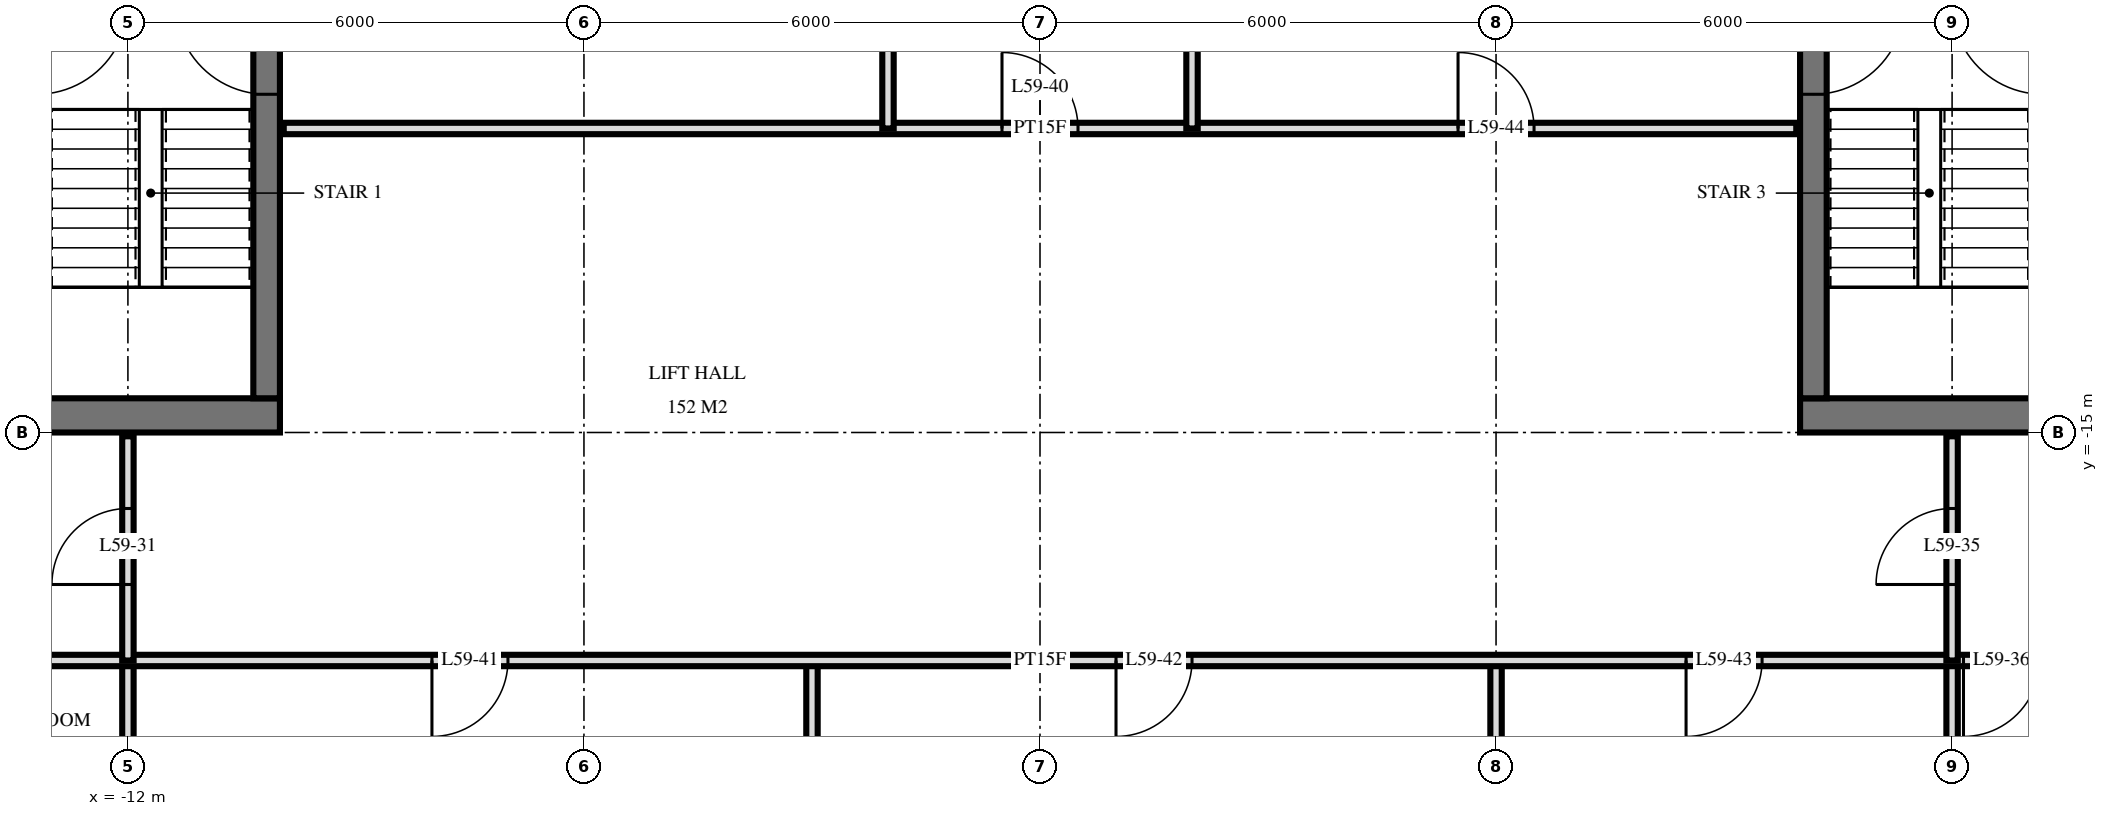
"""IFC4 building model, lengths in metres.
Left out: names, types, materials, properties, quantities, classifications, styles, units other than length and angle.
Written with IfcOpenShell. Run it as: python <this file> out.ifc"""

import sys

from ifc_helpers import new_model, si_unit, direction, frame, frame_2d, origin, place, context, subcontext, project, spatial, rectangle, extrude, element, fill, save


model = new_model("IFC4")
c1 = context("Model", 3, precision=1e-05, world=origin(), true_north=direction((0.0, 1.0)))
c2 = subcontext(c1, "Body", "Model", "MODEL_VIEW")
j1 = project(units=[si_unit("LENGTHUNIT", "METRE"), si_unit("PLANEANGLEUNIT", "RADIAN")], contexts=[c1])
p1 = place(None, origin())
s1 = spatial("IfcSite", under=j1, at=p1, CompositionType="ELEMENT")
p2 = place(p1, origin())
s2 = spatial("IfcBuilding", under=s1, at=p2, CompositionType="ELEMENT")
p3 = place(p2, frame((0.0, 0.0, 225.6)))
s3 = spatial("IfcBuildingStorey", under=s2, at=p3, CompositionType="ELEMENT", Elevation=225.6)
p4 = place(p3, frame((-24.5, -14.775, 0.0), z_axis=(0.0, 0.0, 1.0), x_axis=(1.0, 0.0, 0.0)))
e1 = element("IfcWall", 1, at=p4, inside=s3, PredefinedType="SHEAR", context=c2, shape_type="SweptSolid", body=[
    extrude(rectangle(XDim=14.5, YDim=0.45, at=frame_2d((7.25, 0.0))), origin(), (0.0, 0.0, 1.0), 3.5),
])
p5 = place(p4, frame((6.2, 0.0, 0.0)))
e2 = element("IfcOpeningElement", 2, at=p5, cuts=e1, PredefinedType="OPENING", context=c2, shape_type="SweptSolid", body=[
    extrude(rectangle(XDim=1.2, YDim=2.1, at=frame_2d((0.6, 1.05))), frame((0.0, 0.235, 0.0), z_axis=(0.0, -1.0, 0.0), x_axis=(1.0, 0.0, 0.0)), (0.0, 0.0, 1.0), 0.47),
])
p6 = place(p4, frame((9.25, 0.0, 0.0)))
e3 = element("IfcOpeningElement", 3, at=p6, cuts=e1, PredefinedType="OPENING", context=c2, shape_type="SweptSolid", body=[
    extrude(rectangle(XDim=1.1, YDim=2.1, at=frame_2d((0.55, 1.05))), frame((0.0, 0.235, 0.0), z_axis=(0.0, -1.0, 0.0), x_axis=(1.0, 0.0, 0.0)), (0.0, 0.0, 1.0), 0.47),
])
p7 = place(p4, frame((3.5, 0.0, 0.0)))
e4 = element("IfcOpeningElement", 4, at=p7, cuts=e1, PredefinedType="OPENING", context=c2, shape_type="SweptSolid", body=[
    extrude(rectangle(XDim=0.9, YDim=2.1, at=frame_2d((0.45, 1.05))), frame((0.0, 0.235, 0.0), z_axis=(0.0, -1.0, 0.0), x_axis=(1.0, 0.0, 0.0)), (0.0, 0.0, 1.0), 0.47),
])
p8 = place(p4, frame((1.05, 0.0, 0.0)))
e5 = element("IfcOpeningElement", 5, at=p8, cuts=e1, PredefinedType="OPENING", context=c2, shape_type="SweptSolid", body=[
    extrude(rectangle(XDim=1.0, YDim=2.1, at=frame_2d((0.5, 1.05))), frame((0.0, 0.235, 0.0), z_axis=(0.0, -1.0, 0.0), x_axis=(1.0, 0.0, 0.0)), (0.0, 0.0, 1.0), 0.47),
])
p9 = place(p3, frame((-10.175, -14.55, 0.0), z_axis=(0.0, 0.0, 1.0), x_axis=(0.0, 1.0, 0.0)))
e6 = element("IfcWall", 6, at=p9, inside=s3, PredefinedType="SHEAR", context=c2, shape_type="SweptSolid", body=[
    extrude(rectangle(XDim=14.1, YDim=0.35, at=frame_2d((7.05, 0.0))), origin(), (0.0, 0.0, 1.0), 3.5),
])
p10 = place(p9, frame((8.4, 0.0, 0.0)))
e7 = element("IfcOpeningElement", 7, at=p10, cuts=e6, PredefinedType="OPENING", context=c2, shape_type="SweptSolid", body=[
    extrude(rectangle(XDim=1.4, YDim=2.4, at=frame_2d((0.7, 1.2))), frame((0.0, 0.185, 0.0), z_axis=(0.0, -1.0, 0.0), x_axis=(1.0, 0.0, 0.0)), (0.0, 0.0, 1.0), 0.37),
])
p11 = place(p9, frame((10.0, 0.0, 0.0)))
e8 = element("IfcOpeningElement", 8, at=p11, cuts=e6, PredefinedType="OPENING", context=c2, shape_type="SweptSolid", body=[
    extrude(rectangle(XDim=1.4, YDim=2.4, at=frame_2d((0.7, 1.2))), frame((0.0, 0.185, 0.0), z_axis=(0.0, -1.0, 0.0), x_axis=(1.0, 0.0, 0.0)), (0.0, 0.0, 1.0), 0.37),
])
p12 = place(p9, frame((4.0, 0.0, 0.0)))
e9 = element("IfcOpeningElement", 9, at=p12, cuts=e6, PredefinedType="OPENING", context=c2, shape_type="SweptSolid", body=[
    extrude(rectangle(XDim=1.2, YDim=2.1, at=frame_2d((0.6, 1.05))), frame((0.0, 0.185, 0.0), z_axis=(0.0, -1.0, 0.0), x_axis=(1.0, 0.0, 0.0)), (0.0, 0.0, 1.0), 0.37),
])
p13 = place(p3, frame((10.0, -14.775, 0.0), z_axis=(0.0, 0.0, 1.0), x_axis=(1.0, 0.0, 0.0)))
e10 = element("IfcWall", 10, at=p13, inside=s3, PredefinedType="SHEAR", context=c2, shape_type="SweptSolid", body=[
    extrude(rectangle(XDim=14.5, YDim=0.45, at=frame_2d((7.25, 0.0))), origin(), (0.0, 0.0, 1.0), 3.5),
])
p14 = place(p13, frame((7.1, 0.0, 0.0)))
e11 = element("IfcOpeningElement", 11, at=p14, cuts=e10, PredefinedType="OPENING", context=c2, shape_type="SweptSolid", body=[
    extrude(rectangle(XDim=1.2, YDim=2.1, at=frame_2d((0.6, 1.05))), frame((0.0, 0.235, 0.0), z_axis=(0.0, -1.0, 0.0), x_axis=(1.0, 0.0, 0.0)), (0.0, 0.0, 1.0), 0.47),
])
p15 = place(p13, frame((4.15, 0.0, 0.0)))
e12 = element("IfcOpeningElement", 12, at=p15, cuts=e10, PredefinedType="OPENING", context=c2, shape_type="SweptSolid", body=[
    extrude(rectangle(XDim=1.1, YDim=2.1, at=frame_2d((0.55, 1.05))), frame((0.0, 0.235, 0.0), z_axis=(0.0, -1.0, 0.0), x_axis=(1.0, 0.0, 0.0)), (0.0, 0.0, 1.0), 0.47),
])
p16 = place(p13, frame((10.1, 0.0, 0.0)))
e13 = element("IfcOpeningElement", 13, at=p16, cuts=e10, PredefinedType="OPENING", context=c2, shape_type="SweptSolid", body=[
    extrude(rectangle(XDim=0.9, YDim=2.1, at=frame_2d((0.45, 1.05))), frame((0.0, 0.235, 0.0), z_axis=(0.0, -1.0, 0.0), x_axis=(1.0, 0.0, 0.0)), (0.0, 0.0, 1.0), 0.47),
])
p17 = place(p13, frame((12.45, 0.0, 0.0)))
e14 = element("IfcOpeningElement", 14, at=p17, cuts=e10, PredefinedType="OPENING", context=c2, shape_type="SweptSolid", body=[
    extrude(rectangle(XDim=1.0, YDim=2.1, at=frame_2d((0.5, 1.05))), frame((0.0, 0.235, 0.0), z_axis=(0.0, -1.0, 0.0), x_axis=(1.0, 0.0, 0.0)), (0.0, 0.0, 1.0), 0.47),
])
p18 = place(p3, frame((10.175, -14.55, 0.0), z_axis=(0.0, 0.0, 1.0), x_axis=(0.0, 1.0, 0.0)))
e15 = element("IfcWall", 15, at=p18, inside=s3, PredefinedType="SHEAR", context=c2, shape_type="SweptSolid", body=[
    extrude(rectangle(XDim=14.1, YDim=0.35, at=frame_2d((7.05, 0.0))), origin(), (0.0, 0.0, 1.0), 3.5),
])
p19 = place(p18, frame((8.4, 0.0, 0.0)))
e16 = element("IfcOpeningElement", 16, at=p19, cuts=e15, PredefinedType="OPENING", context=c2, shape_type="SweptSolid", body=[
    extrude(rectangle(XDim=1.4, YDim=2.4, at=frame_2d((0.7, 1.2))), frame((0.0, 0.185, 0.0), z_axis=(0.0, -1.0, 0.0), x_axis=(1.0, 0.0, 0.0)), (0.0, 0.0, 1.0), 0.37),
])
p20 = place(p18, frame((10.0, 0.0, 0.0)))
e17 = element("IfcOpeningElement", 17, at=p20, cuts=e15, PredefinedType="OPENING", context=c2, shape_type="SweptSolid", body=[
    extrude(rectangle(XDim=1.4, YDim=2.4, at=frame_2d((0.7, 1.2))), frame((0.0, 0.185, 0.0), z_axis=(0.0, -1.0, 0.0), x_axis=(1.0, 0.0, 0.0)), (0.0, 0.0, 1.0), 0.37),
])
p21 = place(p18, frame((4.0, 0.0, 0.0)))
e18 = element("IfcOpeningElement", 18, at=p21, cuts=e15, PredefinedType="OPENING", context=c2, shape_type="SweptSolid", body=[
    extrude(rectangle(XDim=1.2, YDim=2.1, at=frame_2d((0.6, 1.05))), frame((0.0, 0.185, 0.0), z_axis=(0.0, -1.0, 0.0), x_axis=(1.0, 0.0, 0.0)), (0.0, 0.0, 1.0), 0.37),
])
p22 = place(p3, frame((12.0, -18.0, 0.0), z_axis=(0.0, 0.0, 1.0), x_axis=(0.0, 1.0, 0.0)))
e19 = element("IfcWall", 19, at=p22, inside=s3, PredefinedType="PARTITIONING", context=c2, shape_type="SweptSolid", body=[
    extrude(rectangle(XDim=2.95, YDim=0.15, at=frame_2d((1.475, 0.0))), origin(), (0.0, 0.0, 1.0), 3.22),
])
p23 = place(p22, frame((1.0, 0.0, 0.0)))
e20 = element("IfcOpeningElement", 20, at=p23, cuts=e19, PredefinedType="OPENING", context=c2, shape_type="SweptSolid", body=[
    extrude(rectangle(XDim=1.0, YDim=2.1, at=frame_2d((0.5, 1.05))), frame((0.0, 0.085, 0.0), z_axis=(0.0, -1.0, 0.0), x_axis=(1.0, 0.0, 0.0)), (0.0, 0.0, 1.0), 0.17),
])
for number, where, z_axis, x_axis in (
    (21, (12.0, -29.22, 0.0), (0.0, 0.0, 1.0), (0.0, 1.0, 0.0)),
    (22, (6.0, -29.22, 0.0), (0.0, 0.0, 1.0), (0.0, 1.0, 0.0)),
):
    element("IfcWall", number, at=place(p3, frame(where, z_axis=z_axis, x_axis=x_axis)), inside=s3, PredefinedType="PARTITIONING", context=c2, shape_type="SweptSolid", body=[
        extrude(rectangle(XDim=11.22, YDim=0.15, at=frame_2d((5.61, 0.0))), origin(), (0.0, 0.0, 1.0), 3.22),
    ])
for number, where, z_axis, x_axis in (
    (23, (2.0, -11.0, 0.0), (0.0, 0.0, 1.0), (0.0, 1.0, 0.0)),
    (24, (-2.0, -11.0, 0.0), (0.0, 0.0, 1.0), (0.0, 1.0, 0.0)),
):
    element("IfcWall", number, at=place(p3, frame(where, z_axis=z_axis, x_axis=x_axis)), inside=s3, PredefinedType="PARTITIONING", context=c2, shape_type="SweptSolid", body=[
        extrude(rectangle(XDim=4.0, YDim=0.15, at=frame_2d((2.0, 0.0))), origin(), (0.0, 0.0, 1.0), 3.22),
    ])
p24 = place(p3, frame((-3.0, -29.22, 0.0), z_axis=(0.0, 0.0, 1.0), x_axis=(0.0, 1.0, 0.0)))
e25 = element("IfcWall", 25, at=p24, inside=s3, PredefinedType="PARTITIONING", context=c2, shape_type="SweptSolid", body=[
    extrude(rectangle(XDim=11.22, YDim=0.15, at=frame_2d((5.61, 0.0))), origin(), (0.0, 0.0, 1.0), 3.22),
])
p25 = place(p3, frame((-12.0, -18.0, 0.0), z_axis=(0.0, 0.0, 1.0), x_axis=(0.0, 1.0, 0.0)))
e26 = element("IfcWall", 26, at=p25, inside=s3, PredefinedType="PARTITIONING", context=c2, shape_type="SweptSolid", body=[
    extrude(rectangle(XDim=2.95, YDim=0.15, at=frame_2d((1.475, 0.0))), origin(), (0.0, 0.0, 1.0), 3.22),
])
p26 = place(p25, frame((1.0, 0.0, 0.0)))
e27 = element("IfcOpeningElement", 27, at=p26, cuts=e26, PredefinedType="OPENING", context=c2, shape_type="SweptSolid", body=[
    extrude(rectangle(XDim=1.0, YDim=2.1, at=frame_2d((0.5, 1.05))), frame((0.0, 0.085, 0.0), z_axis=(0.0, -1.0, 0.0), x_axis=(1.0, 0.0, 0.0)), (0.0, 0.0, 1.0), 0.17),
])
p27 = place(p3, frame((-12.0, -29.22, 0.0), z_axis=(0.0, 0.0, 1.0), x_axis=(0.0, 1.0, 0.0)))
e28 = element("IfcWall", 28, at=p27, inside=s3, PredefinedType="PARTITIONING", context=c2, shape_type="SweptSolid", body=[
    extrude(rectangle(XDim=11.22, YDim=0.15, at=frame_2d((5.61, 0.0))), origin(), (0.0, 0.0, 1.0), 3.22),
])
p28 = place(p3, frame((-26.82, -18.0, 0.0), z_axis=(0.0, 0.0, 1.0), x_axis=(1.0, 0.0, 0.0)))
e29 = element("IfcWall", 29, at=p28, inside=s3, PredefinedType="PARTITIONING", context=c2, shape_type="SweptSolid", body=[
    extrude(rectangle(XDim=53.64, YDim=0.15, at=frame_2d((26.82, 0.0))), origin(), (0.0, 0.0, 1.0), 3.22),
])
p29 = place(p28, frame((4.92, 0.0, 0.0)))
e30 = element("IfcOpeningElement", 30, at=p29, cuts=e29, PredefinedType="OPENING", context=c2, shape_type="SweptSolid", body=[
    extrude(rectangle(XDim=1.0, YDim=2.1, at=frame_2d((0.5, 1.05))), frame((0.0, 0.085, 0.0), z_axis=(0.0, -1.0, 0.0), x_axis=(1.0, 0.0, 0.0)), (0.0, 0.0, 1.0), 0.17),
])
p30 = place(p28, frame((1.62, 0.0, 0.0)))
e31 = element("IfcOpeningElement", 31, at=p30, cuts=e29, PredefinedType="OPENING", context=c2, shape_type="SweptSolid", body=[
    extrude(rectangle(XDim=1.0, YDim=2.1, at=frame_2d((0.5, 1.05))), frame((0.0, 0.085, 0.0), z_axis=(0.0, -1.0, 0.0), x_axis=(1.0, 0.0, 0.0)), (0.0, 0.0, 1.0), 0.17),
])
p31 = place(p28, frame((38.97, 0.0, 0.0)))
e32 = element("IfcOpeningElement", 32, at=p31, cuts=e29, PredefinedType="OPENING", context=c2, shape_type="SweptSolid", body=[
    extrude(rectangle(XDim=1.0, YDim=2.1, at=frame_2d((0.5, 1.05))), frame((0.0, 0.085, 0.0), z_axis=(0.0, -1.0, 0.0), x_axis=(1.0, 0.0, 0.0)), (0.0, 0.0, 1.0), 0.17),
])
p32 = place(p28, frame((48.72, 0.0, 0.0)))
e33 = element("IfcOpeningElement", 33, at=p32, cuts=e29, PredefinedType="OPENING", context=c2, shape_type="SweptSolid", body=[
    extrude(rectangle(XDim=1.0, YDim=2.1, at=frame_2d((0.5, 1.05))), frame((0.0, 0.085, 0.0), z_axis=(0.0, -1.0, 0.0), x_axis=(1.0, 0.0, 0.0)), (0.0, 0.0, 1.0), 0.17),
])
p33 = place(p28, frame((46.92, 0.0, 0.0)))
e34 = element("IfcOpeningElement", 34, at=p33, cuts=e29, PredefinedType="OPENING", context=c2, shape_type="SweptSolid", body=[
    extrude(rectangle(XDim=1.0, YDim=2.1, at=frame_2d((0.5, 1.05))), frame((0.0, 0.085, 0.0), z_axis=(0.0, -1.0, 0.0), x_axis=(1.0, 0.0, 0.0)), (0.0, 0.0, 1.0), 0.17),
])
p34 = place(p28, frame((18.82, 0.0, 0.0)))
e35 = element("IfcOpeningElement", 35, at=p34, cuts=e29, PredefinedType="OPENING", context=c2, shape_type="SweptSolid", body=[
    extrude(rectangle(XDim=1.0, YDim=2.1, at=frame_2d((0.5, 1.05))), frame((0.0, 0.085, 0.0), z_axis=(0.0, -1.0, 0.0), x_axis=(1.0, 0.0, 0.0)), (0.0, 0.0, 1.0), 0.17),
])
p35 = place(p28, frame((27.82, 0.0, 0.0)))
e36 = element("IfcOpeningElement", 36, at=p35, cuts=e29, PredefinedType="OPENING", context=c2, shape_type="SweptSolid", body=[
    extrude(rectangle(XDim=1.0, YDim=2.1, at=frame_2d((0.5, 1.05))), frame((0.0, 0.085, 0.0), z_axis=(0.0, -1.0, 0.0), x_axis=(1.0, 0.0, 0.0)), (0.0, 0.0, 1.0), 0.17),
])
p36 = place(p28, frame((35.32, 0.0, 0.0)))
e37 = element("IfcOpeningElement", 37, at=p36, cuts=e29, PredefinedType="OPENING", context=c2, shape_type="SweptSolid", body=[
    extrude(rectangle(XDim=1.0, YDim=2.1, at=frame_2d((0.5, 1.05))), frame((0.0, 0.085, 0.0), z_axis=(0.0, -1.0, 0.0), x_axis=(1.0, 0.0, 0.0)), (0.0, 0.0, 1.0), 0.17),
])
p37 = place(p3, frame((-9.95, -11.0, 0.0), z_axis=(0.0, 0.0, 1.0), x_axis=(1.0, 0.0, 0.0)))
e38 = element("IfcWall", 38, at=p37, inside=s3, PredefinedType="PARTITIONING", context=c2, shape_type="SweptSolid", body=[
    extrude(rectangle(XDim=19.9, YDim=0.15, at=frame_2d((9.95, 0.0))), origin(), (0.0, 0.0, 1.0), 3.22),
])
p38 = place(p37, frame((9.45, 0.0, 0.0)))
e39 = element("IfcOpeningElement", 39, at=p38, cuts=e38, PredefinedType="OPENING", context=c2, shape_type="SweptSolid", body=[
    extrude(rectangle(XDim=1.0, YDim=2.1, at=frame_2d((0.5, 1.05))), frame((0.0, 0.085, 0.0), z_axis=(0.0, -1.0, 0.0), x_axis=(1.0, 0.0, 0.0)), (0.0, 0.0, 1.0), 0.17),
])
p39 = place(p37, frame((15.45, 0.0, 0.0)))
e40 = element("IfcOpeningElement", 40, at=p39, cuts=e38, PredefinedType="OPENING", context=c2, shape_type="SweptSolid", body=[
    extrude(rectangle(XDim=1.0, YDim=2.1, at=frame_2d((0.5, 1.05))), frame((0.0, 0.085, 0.0), z_axis=(0.0, -1.0, 0.0), x_axis=(1.0, 0.0, 0.0)), (0.0, 0.0, 1.0), 0.17),
])
p40 = place(p12, origin())
e41 = element("IfcDoor", 41, at=p40, inside=s3, OperationType="SINGLE_SWING_LEFT", PredefinedType="DOOR", context=c2, shape_type="SweptSolid", body=[
    extrude(rectangle(XDim=1.2, YDim=2.1, at=frame_2d((0.6, 1.05))), frame((0.0, 0.025, 0.0), z_axis=(0.0, -1.0, 0.0), x_axis=(1.0, 0.0, 0.0)), (0.0, 0.0, 1.0), 0.05),
])
fill(e9, e41)
p41 = place(p21, frame((0.6, 0.0, 0.0), z_axis=(0.0, 0.0, 1.0), x_axis=(-1.0, 0.0, 0.0)))
e42 = element("IfcDoor", 42, at=p41, inside=s3, OperationType="SINGLE_SWING_RIGHT", PredefinedType="DOOR", context=c2, shape_type="SweptSolid", body=[
    extrude(rectangle(XDim=1.2, YDim=2.1, at=frame_2d((0.0, 1.05))), frame((0.0, -0.025, 0.0), z_axis=(0.0, 1.0, 0.0), x_axis=(-1.0, 0.0, 0.0)), (0.0, 0.0, 1.0), 0.05),
])
fill(e18, e42)
p42 = place(p26, origin())
e43 = element("IfcDoor", 43, at=p42, inside=s3, OperationType="SINGLE_SWING_RIGHT", PredefinedType="DOOR", context=c2, shape_type="SweptSolid", body=[
    extrude(rectangle(XDim=1.0, YDim=2.1, at=frame_2d((0.5, 1.05))), frame((0.0, 0.025, 0.0), z_axis=(0.0, -1.0, 0.0), x_axis=(1.0, 0.0, 0.0)), (0.0, 0.0, 1.0), 0.05),
])
fill(e27, e43)
p43 = place(p23, origin())
e44 = element("IfcDoor", 44, at=p43, inside=s3, OperationType="SINGLE_SWING_RIGHT", PredefinedType="DOOR", context=c2, shape_type="SweptSolid", body=[
    extrude(rectangle(XDim=1.0, YDim=2.1, at=frame_2d((0.5, 1.05))), frame((0.0, 0.025, 0.0), z_axis=(0.0, -1.0, 0.0), x_axis=(1.0, 0.0, 0.0)), (0.0, 0.0, 1.0), 0.05),
])
fill(e20, e44)
p44 = place(p31, frame((0.5, 0.0, 0.0), z_axis=(0.0, 0.0, 1.0), x_axis=(-1.0, 0.0, 0.0)))
e45 = element("IfcDoor", 45, at=p44, inside=s3, OperationType="SINGLE_SWING_LEFT", PredefinedType="DOOR", context=c2, shape_type="SweptSolid", body=[
    extrude(rectangle(XDim=1.0, YDim=2.1, at=frame_2d((0.0, 1.05))), frame((0.0, -0.025, 0.0), z_axis=(0.0, 1.0, 0.0), x_axis=(-1.0, 0.0, 0.0)), (0.0, 0.0, 1.0), 0.05),
])
fill(e32, e45)
p45 = place(p38, origin())
e46 = element("IfcDoor", 46, at=p45, inside=s3, OperationType="SINGLE_SWING_RIGHT", PredefinedType="DOOR", context=c2, shape_type="SweptSolid", body=[
    extrude(rectangle(XDim=1.0, YDim=2.1, at=frame_2d((0.5, 1.05))), frame((0.0, 0.025, 0.0), z_axis=(0.0, -1.0, 0.0), x_axis=(1.0, 0.0, 0.0)), (0.0, 0.0, 1.0), 0.05),
])
fill(e39, e46)
p46 = place(p34, frame((0.5, 0.0, 0.0), z_axis=(0.0, 0.0, 1.0), x_axis=(-1.0, 0.0, 0.0)))
e47 = element("IfcDoor", 47, at=p46, inside=s3, OperationType="SINGLE_SWING_LEFT", PredefinedType="DOOR", context=c2, shape_type="SweptSolid", body=[
    extrude(rectangle(XDim=1.0, YDim=2.1, at=frame_2d((0.0, 1.05))), frame((0.0, -0.025, 0.0), z_axis=(0.0, 1.0, 0.0), x_axis=(-1.0, 0.0, 0.0)), (0.0, 0.0, 1.0), 0.05),
])
fill(e35, e47)
p47 = place(p35, frame((0.5, 0.0, 0.0), z_axis=(0.0, 0.0, 1.0), x_axis=(-1.0, 0.0, 0.0)))
e48 = element("IfcDoor", 48, at=p47, inside=s3, OperationType="SINGLE_SWING_LEFT", PredefinedType="DOOR", context=c2, shape_type="SweptSolid", body=[
    extrude(rectangle(XDim=1.0, YDim=2.1, at=frame_2d((0.0, 1.05))), frame((0.0, -0.025, 0.0), z_axis=(0.0, 1.0, 0.0), x_axis=(-1.0, 0.0, 0.0)), (0.0, 0.0, 1.0), 0.05),
])
fill(e36, e48)
p48 = place(p36, frame((0.5, 0.0, 0.0), z_axis=(0.0, 0.0, 1.0), x_axis=(-1.0, 0.0, 0.0)))
e49 = element("IfcDoor", 49, at=p48, inside=s3, OperationType="SINGLE_SWING_LEFT", PredefinedType="DOOR", context=c2, shape_type="SweptSolid", body=[
    extrude(rectangle(XDim=1.0, YDim=2.1, at=frame_2d((0.0, 1.05))), frame((0.0, -0.025, 0.0), z_axis=(0.0, 1.0, 0.0), x_axis=(-1.0, 0.0, 0.0)), (0.0, 0.0, 1.0), 0.05),
])
fill(e37, e49)
p49 = place(p39, origin())
e50 = element("IfcDoor", 50, at=p49, inside=s3, OperationType="SINGLE_SWING_RIGHT", PredefinedType="DOOR", context=c2, shape_type="SweptSolid", body=[
    extrude(rectangle(XDim=1.0, YDim=2.1, at=frame_2d((0.5, 1.05))), frame((0.0, 0.025, 0.0), z_axis=(0.0, -1.0, 0.0), x_axis=(1.0, 0.0, 0.0)), (0.0, 0.0, 1.0), 0.05),
])
fill(e40, e50)
save(model, sys.argv[1])
